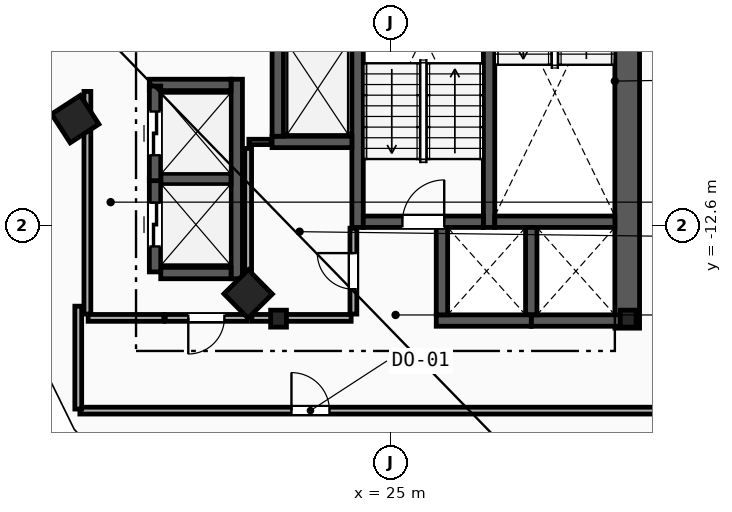
"""IFC4 building model, lengths in metres.
Left out: names, types, materials, properties, quantities, classifications, styles, units other than length and angle.
Written with IfcOpenShell. Run it as: python <this file> out.ifc"""

import sys

from ifc_helpers import new_model, si_unit, direction, frame, frame_2d, origin, origin_2d, place, context, subcontext, project, spatial, rectangle, i_section, extrude, element, fill, save


model = new_model("IFC4")
c1 = context("Model", 3, precision=1e-05, world=origin(), true_north=direction((0.0, 1.0)))
c2 = subcontext(c1, "Body", "Model", "MODEL_VIEW")
j1 = project(units=[si_unit("LENGTHUNIT", "METRE"), si_unit("PLANEANGLEUNIT", "RADIAN")], contexts=[c1])
p1 = place(None, origin())
s1 = spatial("IfcSite", under=j1, at=p1, CompositionType="ELEMENT")
p2 = place(p1, origin())
s2 = spatial("IfcBuilding", under=s1, at=p2, CompositionType="ELEMENT")
p3 = place(p2, frame((0.0, 0.0, 202.6)))
s3 = spatial("IfcBuildingStorey", under=s2, at=p3, CompositionType="ELEMENT", Elevation=202.6)
for number, where, z_axis, x_axis in (
    (1, (22.05, -15.05, 0.0), (0.0, 0.0, 1.0), (1.0, 0.0, 0.0)),
    (2, (31.25, -15.05, 0.0), (0.0, 0.0, 1.0), (1.0, 0.0, 0.0)),
):
    element("IfcColumn", number, at=place(p3, frame(where, z_axis=z_axis, x_axis=x_axis)), inside=s3, PredefinedType="COLUMN", context=c2, shape_type="SweptSolid", body=[
        extrude(i_section(OverallWidth=0.416, OverallDepth=0.446, WebThickness=0.039, FlangeThickness=0.063, FilletRadius=0.018, at=origin_2d()), origin(), (0.0, 0.0, 1.0), 3.6),
    ])
for number, where, z_axis, x_axis in (
    (3, (16.7, -9.8, 0.0), (0.0, 0.0, 1.0), (0.544, -0.839, 0.0)),
    (4, (21.25, -14.4, 0.0), (0.0, 0.0, 1.0), (0.703, -0.711, 0.0)),
):
    element("IfcColumn", number, at=place(p3, frame(where, z_axis=z_axis, x_axis=x_axis)), inside=s3, PredefinedType="COLUMN", context=c2, shape_type="SweptSolid", body=[
        extrude(rectangle(XDim=0.9, YDim=0.9, at=origin_2d()), origin(), (0.0, 0.0, 1.0), 3.6),
    ])
p4 = place(p3, frame((31.225, -15.3, 0.0), z_axis=(0.0, 0.0, 1.0), x_axis=(0.0, 1.0, 0.0)))
e5 = element("IfcWall", 5, at=p4, inside=s3, PredefinedType="SHEAR", context=c2, shape_type="SweptSolid", body=[
    extrude(rectangle(XDim=13.33, YDim=0.65, at=frame_2d((6.665, 0.0))), origin(), (0.0, 0.0, 1.0), 3.34),
])
for number, where, z_axis, x_axis in (
    (6, (27.59, -12.65, 0.0), (0.0, 0.0, 1.0), (0.0, 1.0, 0.0)),
    (7, (24.13, -12.65, 0.0), (0.0, 0.0, 1.0), (0.0, 1.0, 0.0)),
):
    element("IfcWall", number, at=place(p3, frame(where, z_axis=z_axis, x_axis=x_axis)), inside=s3, PredefinedType="SHEAR", context=c2, shape_type="SweptSolid", body=[
        extrude(rectangle(XDim=10.68, YDim=0.3, at=frame_2d((5.34, 0.0))), origin(), (0.0, 0.0, 1.0), 3.34),
    ])
p5 = place(p3, frame((27.74, -12.5, 0.0), z_axis=(0.0, 0.0, 1.0), x_axis=(1.0, 0.0, 0.0)))
e8 = element("IfcWall", 8, at=p5, inside=s3, PredefinedType="SHEAR", context=c2, shape_type="SweptSolid", body=[
    extrude(rectangle(XDim=3.16, YDim=0.3, at=frame_2d((1.58, 0.0))), origin(), (0.0, 0.0, 1.0), 3.34),
])
p6 = place(p3, frame((24.28, -12.5, 0.0), z_axis=(0.0, 0.0, 1.0), x_axis=(1.0, 0.0, 0.0)))
e9 = element("IfcWall", 9, at=p6, inside=s3, PredefinedType="SHEAR", context=c2, shape_type="SweptSolid", body=[
    extrude(rectangle(XDim=3.16, YDim=0.3, at=frame_2d((1.58, 0.0))), origin(), (0.0, 0.0, 1.0), 3.34),
])
p7 = place(p6, frame((1.03, 0.0, 0.0)))
e10 = element("IfcOpeningElement", 10, at=p7, cuts=e9, PredefinedType="OPENING", context=c2, shape_type="SweptSolid", body=[
    extrude(rectangle(XDim=1.1, YDim=2.15, at=frame_2d((0.55, 1.075))), frame((0.0, 0.16, 0.0), z_axis=(0.0, -1.0, 0.0), x_axis=(1.0, 0.0, 0.0)), (0.0, 0.0, 1.0), 0.32),
])
p8 = place(p3, frame((21.88, -10.4, 0.0), z_axis=(0.0, 0.0, 1.0), x_axis=(1.0, 0.0, 0.0)))
e11 = element("IfcWall", 11, at=p8, inside=s3, PredefinedType="SHEAR", context=c2, shape_type="SweptSolid", body=[
    extrude(rectangle(XDim=2.1, YDim=0.3, at=frame_2d((1.05, 0.0))), origin(), (0.0, 0.0, 1.0), 3.34),
])
for number, where, z_axis, x_axis in (
    (12, (22.03, -10.25, 0.0), (0.0, 0.0, 1.0), (0.0, 1.0, 0.0)),
    (13, (28.7, -15.1, 0.0), (0.0, 0.0, 1.0), (1.0, 0.0, 0.0)),
):
    element("IfcWall", number, at=place(p3, frame(where, z_axis=z_axis, x_axis=x_axis)), inside=s3, PredefinedType="SHEAR", context=c2, shape_type="SweptSolid", body=[
        extrude(rectangle(XDim=2.5, YDim=0.3, at=frame_2d((1.25, 0.0))), origin(), (0.0, 0.0, 1.0), 3.34),
    ])
p9 = place(p3, frame((28.7, -14.95, 0.0), z_axis=(0.0, 0.0, 1.0), x_axis=(0.0, 1.0, 0.0)))
e14 = element("IfcWall", 14, at=p9, inside=s3, PredefinedType="SHEAR", context=c2, shape_type="SweptSolid", body=[
    extrude(rectangle(XDim=2.3, YDim=0.3, at=frame_2d((1.15, 0.0))), origin(), (0.0, 0.0, 1.0), 3.34),
])
p10 = place(p3, frame((26.2, -15.1, 0.0), z_axis=(0.0, 0.0, 1.0), x_axis=(1.0, 0.0, 0.0)))
e15 = element("IfcWall", 15, at=p10, inside=s3, PredefinedType="SHEAR", context=c2, shape_type="SweptSolid", body=[
    extrude(rectangle(XDim=2.5, YDim=0.3, at=frame_2d((1.25, 0.0))), origin(), (0.0, 0.0, 1.0), 3.34),
])
p11 = place(p3, frame((26.35, -14.95, 0.0), z_axis=(0.0, 0.0, 1.0), x_axis=(0.0, 1.0, 0.0)))
e16 = element("IfcWall", 16, at=p11, inside=s3, PredefinedType="SHEAR", context=c2, shape_type="SweptSolid", body=[
    extrude(rectangle(XDim=2.3, YDim=0.3, at=frame_2d((1.15, 0.0))), origin(), (0.0, 0.0, 1.0), 3.34),
])
p12 = place(p3, frame((20.95, -14.0, 0.0), z_axis=(0.0, 0.0, 1.0), x_axis=(0.0, 1.0, 0.0)))
e17 = element("IfcWall", 17, at=p12, inside=s3, PredefinedType="SHEAR", context=c2, shape_type="SweptSolid", body=[
    extrude(rectangle(XDim=5.25, YDim=0.3, at=frame_2d((2.625, 0.0))), origin(), (0.0, 0.0, 1.0), 3.34),
])
p13 = place(p3, frame((18.95, -13.85, 0.0), z_axis=(0.0, 0.0, 1.0), x_axis=(1.0, 0.0, 0.0)))
e18 = element("IfcWall", 18, at=p13, inside=s3, PredefinedType="SHEAR", context=c2, shape_type="SweptSolid", body=[
    extrude(rectangle(XDim=1.85, YDim=0.3, at=frame_2d((0.925, 0.0))), origin(), (0.0, 0.0, 1.0), 3.34),
])
p14 = place(p3, frame((18.65, -8.9, 0.0), z_axis=(0.0, 0.0, 1.0), x_axis=(1.0, 0.0, 0.0)))
e19 = element("IfcWall", 19, at=p14, inside=s3, PredefinedType="SHEAR", context=c2, shape_type="SweptSolid", body=[
    extrude(rectangle(XDim=2.15, YDim=0.3, at=frame_2d((1.075, 0.0))), origin(), (0.0, 0.0, 1.0), 3.34),
])
p15 = place(p3, frame((18.95, -11.375, 0.0), z_axis=(0.0, 0.0, 1.0), x_axis=(1.0, 0.0, 0.0)))
e20 = element("IfcWall", 20, at=p15, inside=s3, PredefinedType="SHEAR", context=c2, shape_type="SweptSolid", body=[
    extrude(rectangle(XDim=1.85, YDim=0.3, at=frame_2d((0.925, 0.0))), origin(), (0.0, 0.0, 1.0), 3.34),
])
p16 = place(p3, frame((18.8, -13.82, 0.0), z_axis=(0.0, 0.0, 1.0), x_axis=(0.0, 1.0, 0.0)))
e21 = element("IfcWall", 21, at=p16, inside=s3, PredefinedType="SHEAR", context=c2, shape_type="SweptSolid", body=[
    extrude(rectangle(XDim=2.49, YDim=0.3, at=frame_2d((1.245, 0.0))), origin(), (0.0, 0.0, 1.0), 3.34),
])
p17 = place(p16, frame((0.67, 0.0, 0.0)))
e22 = element("IfcOpeningElement", 22, at=p17, cuts=e21, PredefinedType="OPENING", context=c2, shape_type="SweptSolid", body=[
    extrude(rectangle(XDim=1.15, YDim=2.2, at=frame_2d((0.575, 1.1))), frame((0.0, 0.16, 0.0), z_axis=(0.0, -1.0, 0.0), x_axis=(1.0, 0.0, 0.0)), (0.0, 0.0, 1.0), 0.32),
])
p18 = place(p3, frame((18.8, -11.42, 0.0), z_axis=(0.0, 0.0, 1.0), x_axis=(0.0, 1.0, 0.0)))
e23 = element("IfcWall", 23, at=p18, inside=s3, PredefinedType="SHEAR", context=c2, shape_type="SweptSolid", body=[
    extrude(rectangle(XDim=2.49, YDim=0.3, at=frame_2d((1.245, 0.0))), origin(), (0.0, 0.0, 1.0), 3.34),
])
p19 = place(p18, frame((0.67, 0.0, 0.0)))
e24 = element("IfcOpeningElement", 24, at=p19, cuts=e23, PredefinedType="OPENING", context=c2, shape_type="SweptSolid", body=[
    extrude(rectangle(XDim=1.15, YDim=2.2, at=frame_2d((0.575, 1.1))), frame((0.0, 0.16, 0.0), z_axis=(0.0, -1.0, 0.0), x_axis=(1.0, 0.0, 0.0)), (0.0, 0.0, 1.0), 0.32),
])
p20 = place(p3, frame((17.02, -14.93, 0.0), z_axis=(0.0, 0.0, 1.0), x_axis=(0.0, 1.0, 0.0)))
e25 = element("IfcWall", 25, at=p20, inside=s3, PredefinedType="PARTITIONING", context=c2, shape_type="SweptSolid", body=[
    extrude(rectangle(XDim=5.86, YDim=0.18, at=frame_2d((2.93, 0.0))), origin(), (0.0, 0.0, 1.0), 3.34),
])
p21 = place(p3, frame((17.04, -15.03, 0.0), z_axis=(0.0, 0.0, 1.0), x_axis=(1.0, 0.0, 0.0)))
e26 = element("IfcWall", 26, at=p21, inside=s3, PredefinedType="PARTITIONING", context=c2, shape_type="SweptSolid", body=[
    extrude(rectangle(XDim=1.99, YDim=0.18, at=frame_2d((0.995, 0.0))), origin(), (0.0, 0.0, 1.0), 3.34),
])
p22 = place(p3, frame((21.23, -15.03, 0.0), z_axis=(0.0, 0.0, 1.0), x_axis=(-1.0, 0.0, 0.0)))
e27 = element("IfcWall", 27, at=p22, inside=s3, PredefinedType="PARTITIONING", context=c2, shape_type="SweptSolid", body=[
    extrude(rectangle(XDim=2.16, YDim=0.18, at=frame_2d((1.08, 0.0))), origin(), (0.0, 0.0, 1.0), 3.34),
])
p23 = place(p22, frame((0.605, 0.0, 0.0)))
e28 = element("IfcOpeningElement", 28, at=p23, cuts=e27, PredefinedType="OPENING", context=c2, shape_type="SweptSolid", body=[
    extrude(rectangle(XDim=0.95, YDim=2.1, at=frame_2d((0.475, 1.05))), frame((0.0, 0.1, 0.0), z_axis=(0.0, -1.0, 0.0), x_axis=(1.0, 0.0, 0.0)), (0.0, 0.0, 1.0), 0.2),
])
p24 = place(p3, frame((21.27, -10.4, 0.0), z_axis=(0.0, 0.0, 1.0), x_axis=(1.0, 0.0, 0.0)))
e29 = element("IfcWall", 29, at=p24, inside=s3, PredefinedType="PARTITIONING", context=c2, shape_type="SweptSolid", body=[
    extrude(rectangle(XDim=0.59, YDim=0.14, at=frame_2d((0.295, 0.0))), origin(), (0.0, 0.0, 1.0), 3.34),
])
p25 = place(p3, frame((21.25, -14.93, 0.0), z_axis=(0.0, 0.0, 1.0), x_axis=(0.0, 1.0, 0.0)))
e30 = element("IfcWall", 30, at=p25, inside=s3, PredefinedType="PARTITIONING", context=c2, shape_type="SweptSolid", body=[
    extrude(rectangle(XDim=4.36, YDim=0.18, at=frame_2d((2.18, 0.0))), origin(), (0.0, 0.0, 1.0), 3.34),
])
p26 = place(p3, frame((21.35, -15.03, 0.0), z_axis=(0.0, 0.0, 1.0), x_axis=(1.0, 0.0, 0.0)))
e31 = element("IfcWall", 31, at=p26, inside=s3, PredefinedType="PARTITIONING", context=c2, shape_type="SweptSolid", body=[
    extrude(rectangle(XDim=2.61, YDim=0.18, at=frame_2d((1.305, 0.0))), origin(), (0.0, 0.0, 1.0), 2.413),
])
p27 = place(p3, frame((24.02, -14.93, 0.0), z_axis=(0.0, 0.0, 1.0), x_axis=(0.0, 1.0, 0.0)))
e32 = element("IfcWall", 32, at=p27, inside=s3, PredefinedType="PARTITIONING", context=c2, shape_type="SweptSolid", body=[
    extrude(rectangle(XDim=2.26, YDim=0.18, at=frame_2d((1.13, 0.0))), origin(), (0.0, 0.0, 1.0), 3.34),
])
p28 = place(p27, frame((0.655, 0.0, 0.0)))
e33 = element("IfcOpeningElement", 33, at=p28, cuts=e32, PredefinedType="OPENING", context=c2, shape_type="SweptSolid", body=[
    extrude(rectangle(XDim=0.95, YDim=2.1, at=frame_2d((0.475, 1.05))), frame((0.0, 0.1, 0.0), z_axis=(0.0, -1.0, 0.0), x_axis=(1.0, 0.0, 0.0)), (0.0, 0.0, 1.0), 0.2),
])
p29 = place(p3, frame((16.822, -17.47, 0.0), z_axis=(0.0, 0.0, 1.0), x_axis=(1.0, 0.0, 0.0)))
e34 = element("IfcWall", 34, at=p29, inside=s3, PredefinedType="PARTITIONING", context=c2, shape_type="SweptSolid", body=[
    extrude(rectangle(XDim=16.807, YDim=0.18, at=frame_2d((8.403, 0.0))), origin(), (0.0, 0.0, 1.0), 3.34),
])
p30 = place(p29, frame((5.569, 0.0, 0.0)))
e35 = element("IfcOpeningElement", 35, at=p30, cuts=e34, PredefinedType="OPENING", context=c2, shape_type="SweptSolid", body=[
    extrude(rectangle(XDim=1.0, YDim=2.15, at=frame_2d((0.5, 1.075))), frame((0.0, 0.1, 0.0), z_axis=(0.0, -1.0, 0.0), x_axis=(1.0, 0.0, 0.0)), (0.0, 0.0, 1.0), 0.2),
])
p31 = place(p3, frame((16.78, -14.721, 0.0), z_axis=(0.0, 0.0, 1.0), x_axis=(0.0, -1.0, 0.0)))
e36 = element("IfcWall", 36, at=p31, inside=s3, PredefinedType="PARTITIONING", context=c2, shape_type="SweptSolid", body=[
    extrude(rectangle(XDim=2.707, YDim=0.18, at=frame_2d((1.354, 0.0))), origin(), (0.0, 0.0, 1.0), 3.34),
])
p32 = place(p7, origin())
e37 = element("IfcDoor", 37, at=p32, inside=s3, OperationType="SINGLE_SWING_RIGHT", PredefinedType="DOOR", context=c2, shape_type="SweptSolid", body=[
    extrude(rectangle(XDim=1.1, YDim=2.15, at=frame_2d((0.55, 1.075))), frame((0.0, 0.025, 0.0), z_axis=(0.0, -1.0, 0.0), x_axis=(1.0, 0.0, 0.0)), (0.0, 0.0, 1.0), 0.05),
])
fill(e10, e37)
p33 = place(p17, origin())
e38 = element("IfcDoor", 38, at=p33, inside=s3, OperationType="SLIDING_TO_LEFT", PredefinedType="TRAPDOOR", context=c2, shape_type="SweptSolid", body=[
    extrude(rectangle(XDim=1.15, YDim=2.2, at=frame_2d((0.575, 1.1))), frame((0.0, 0.025, 0.0), z_axis=(0.0, -1.0, 0.0), x_axis=(1.0, 0.0, 0.0)), (0.0, 0.0, 1.0), 0.05),
])
fill(e22, e38)
p34 = place(p19, origin())
e39 = element("IfcDoor", 39, at=p34, inside=s3, OperationType="SLIDING_TO_LEFT", PredefinedType="TRAPDOOR", context=c2, shape_type="SweptSolid", body=[
    extrude(rectangle(XDim=1.15, YDim=2.2, at=frame_2d((0.575, 1.1))), frame((0.0, 0.025, 0.0), z_axis=(0.0, -1.0, 0.0), x_axis=(1.0, 0.0, 0.0)), (0.0, 0.0, 1.0), 0.05),
])
fill(e24, e39)
p35 = place(p30, origin())
e40 = element("IfcDoor", 40, at=p35, inside=s3, OperationType="SINGLE_SWING_LEFT", PredefinedType="DOOR", context=c2, shape_type="SweptSolid", body=[
    extrude(rectangle(XDim=1.0, YDim=2.15, at=frame_2d((0.5, 1.075))), frame((0.0, 0.025, 0.0), z_axis=(0.0, -1.0, 0.0), x_axis=(1.0, 0.0, 0.0)), (0.0, 0.0, 1.0), 0.05),
])
fill(e35, e40)
p36 = place(p28, origin())
e41 = element("IfcDoor", 41, at=p36, inside=s3, OperationType="SINGLE_SWING_RIGHT", PredefinedType="DOOR", context=c2, shape_type="SweptSolid", body=[
    extrude(rectangle(XDim=0.95, YDim=2.1, at=frame_2d((0.475, 1.05))), frame((0.0, 0.025, 0.0), z_axis=(0.0, -1.0, 0.0), x_axis=(1.0, 0.0, 0.0)), (0.0, 0.0, 1.0), 0.05),
])
fill(e33, e41)
p37 = place(p23, origin())
e42 = element("IfcDoor", 42, at=p37, inside=s3, OperationType="SINGLE_SWING_RIGHT", PredefinedType="DOOR", context=c2, shape_type="SweptSolid", body=[
    extrude(rectangle(XDim=0.95, YDim=2.1, at=frame_2d((0.475, 1.05))), frame((0.0, 0.025, 0.0), z_axis=(0.0, -1.0, 0.0), x_axis=(1.0, 0.0, 0.0)), (0.0, 0.0, 1.0), 0.05),
])
fill(e28, e42)
save(model, sys.argv[1])
